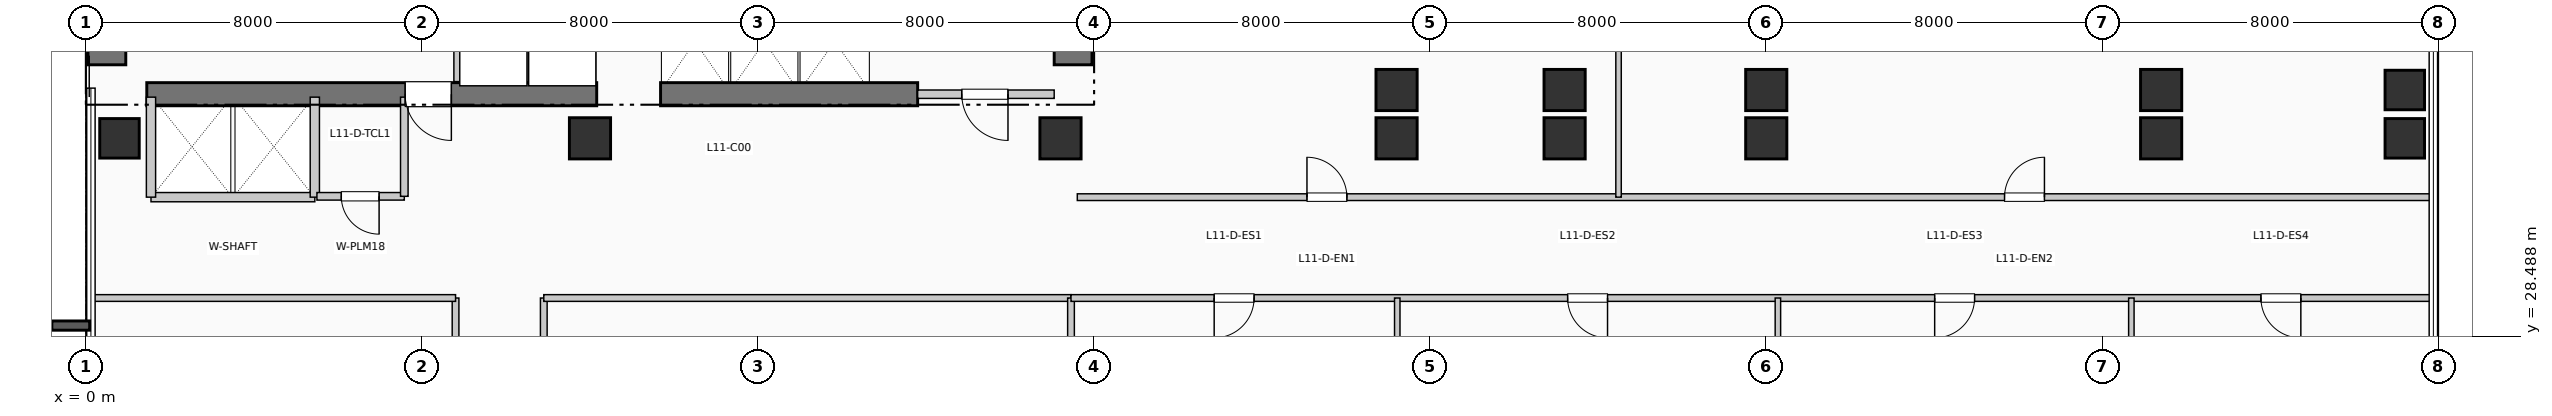
"""IFC4 building model, lengths in metres.
Left out: names, types, materials, properties, quantities, classifications, styles, units other than length and angle.
Written with IfcOpenShell. Run it as: python <this file> out.ifc"""

import sys

from ifc_helpers import new_model, si_unit, direction, frame, frame_2d, origin, origin_2d, place, context, subcontext, project, spatial, rectangle, extrude, element, fill, save


model = new_model("IFC4")
c1 = context("Model", 3, precision=1e-05, world=origin(), true_north=direction((0.0, 1.0)))
c2 = subcontext(c1, "Body", "Model", "MODEL_VIEW")
j1 = project(units=[si_unit("LENGTHUNIT", "METRE"), si_unit("PLANEANGLEUNIT", "RADIAN")], contexts=[c1])
p1 = place(None, origin())
s1 = spatial("IfcSite", under=j1, at=p1, CompositionType="ELEMENT")
p2 = place(p1, origin())
s2 = spatial("IfcBuilding", under=s1, at=p2, CompositionType="ELEMENT")
p3 = place(p2, frame((0.0, 0.0, 50.16)))
s3 = spatial("IfcBuildingStorey", under=s2, at=p3, CompositionType="ELEMENT", Elevation=50.16)
p4 = place(p3, frame((0.5, 34.95, 0.0), z_axis=(0.0, 0.0, 1.0), x_axis=(0.0, 1.0, 0.0)))
e1 = element("IfcWall", 1, at=p4, inside=s3, PredefinedType="SHEAR", context=c2, shape_type="SweptSolid", body=[
    extrude(rectangle(XDim=7.9, YDim=0.9, at=frame_2d((3.95, 0.0))), origin(), (0.0, 0.0, 1.0), 3.96),
])
p5 = place(p3, frame((23.5, 34.95, 0.0), z_axis=(0.0, 0.0, 1.0), x_axis=(0.0, 1.0, 0.0)))
e2 = element("IfcWall", 2, at=p5, inside=s3, PredefinedType="SHEAR", context=c2, shape_type="SweptSolid", body=[
    extrude(rectangle(XDim=10.64, YDim=0.9, at=frame_2d((5.32, 0.0))), origin(), (0.0, 0.0, 1.0), 3.96),
])
p6 = place(p3, frame((1.45, 34.25, 0.0), z_axis=(0.0, 0.0, 1.0), x_axis=(1.0, 0.0, 0.0)))
e3 = element("IfcWall", 3, at=p6, inside=s3, PredefinedType="SHEAR", context=c2, shape_type="SweptSolid", body=[
    extrude(rectangle(XDim=10.71, YDim=0.55, at=frame_2d((5.355, 0.0))), origin(), (0.0, 0.0, 1.0), 3.96),
])
p7 = place(p6, frame((7.25, 0.0, 0.0), z_axis=(0.0, 0.0, 1.0), x_axis=(-1.0, 0.0, 0.0)))
e4 = element("IfcOpeningElement", 4, at=p7, cuts=e3, PredefinedType="OPENING", context=c2, shape_type="SweptSolid", body=[
    extrude(rectangle(XDim=1.1, YDim=2.15, at=frame_2d((0.55, 1.075))), frame((0.0, 0.285, 0.0), z_axis=(0.0, -1.0, 0.0), x_axis=(1.0, 0.0, 0.0)), (0.0, 0.0, 1.0), 0.57),
])
p8 = place(p3, frame((13.68, 34.25, 0.0), z_axis=(0.0, 0.0, 1.0), x_axis=(1.0, 0.0, 0.0)))
e5 = element("IfcWall", 5, at=p8, inside=s3, PredefinedType="SHEAR", context=c2, shape_type="SweptSolid", body=[
    extrude(rectangle(XDim=6.12, YDim=0.55, at=frame_2d((3.06, 0.0))), origin(), (0.0, 0.0, 1.0), 3.96),
])
p9 = place(p3, frame((0.8, 33.2, 0.0), z_axis=(0.0, 0.0, 1.0), x_axis=(1.0, 0.0, 0.0)))
e6 = element("IfcColumn", 6, at=p9, inside=s3, PredefinedType="COLUMN", context=c2, shape_type="SweptSolid", body=[
    extrude(rectangle(XDim=0.94, YDim=0.94, at=origin_2d()), origin(), (0.0, 0.0, 1.0), 3.96),
])
for number, where, z_axis, x_axis in (
    (7, (12.0, 33.2, 0.0), (0.0, 0.0, 1.0), (1.0, 0.0, 0.0)),
    (8, (23.2, 33.2, 0.0), (0.0, 0.0, 1.0), (1.0, 0.0, 0.0)),
    (9, (31.2, 33.2, 0.0), (0.0, 0.0, 1.0), (1.0, 0.0, 0.0)),
    (10, (31.2, 34.35, 0.0), (0.0, 0.0, 1.0), (1.0, 0.0, 0.0)),
    (11, (35.2, 33.2, 0.0), (0.0, 0.0, 1.0), (1.0, 0.0, 0.0)),
    (12, (35.2, 34.35, 0.0), (0.0, 0.0, 1.0), (1.0, 0.0, 0.0)),
    (13, (40.0, 33.2, 0.0), (0.0, 0.0, 1.0), (1.0, 0.0, 0.0)),
    (14, (40.0, 34.35, 0.0), (0.0, 0.0, 1.0), (1.0, 0.0, 0.0)),
    (15, (49.4, 33.2, 0.0), (0.0, 0.0, 1.0), (1.0, 0.0, 0.0)),
    (16, (49.4, 34.35, 0.0), (0.0, 0.0, 1.0), (1.0, 0.0, 0.0)),
):
    element("IfcColumn", number, at=place(p3, frame(where, z_axis=z_axis, x_axis=x_axis)), inside=s3, PredefinedType="COLUMN", context=c2, shape_type="SweptSolid", body=[
        extrude(rectangle(XDim=0.98, YDim=0.98, at=origin_2d()), origin(), (0.0, 0.0, 1.0), 3.96),
    ])
for number, where, z_axis, x_axis in (
    (17, (55.2, 33.2, 0.0), (0.0, 0.0, 1.0), (1.0, 0.0, 0.0)),
    (18, (55.2, 34.35, 0.0), (0.0, 0.0, 1.0), (1.0, 0.0, 0.0)),
):
    element("IfcColumn", number, at=place(p3, frame(where, z_axis=z_axis, x_axis=x_axis)), inside=s3, PredefinedType="COLUMN", context=c2, shape_type="SweptSolid", body=[
        extrude(rectangle(XDim=0.94, YDim=0.94, at=origin_2d()), origin(), (0.0, 0.0, 1.0), 3.96),
    ])
p10 = place(p3, frame((8.86, 34.55, 0.0), z_axis=(0.0, 0.0, 1.0), x_axis=(0.0, 1.0, 0.0)))
e19 = element("IfcWall", 19, at=p10, inside=s3, PredefinedType="PARTITIONING", context=c2, shape_type="SweptSolid", body=[
    extrude(rectangle(XDim=2.5, YDim=0.2, at=frame_2d((1.25, 0.0))), origin(), (0.0, 0.0, 1.0), 3.71),
])
p11 = place(p3, frame((19.8, 34.25, 0.0), z_axis=(0.0, 0.0, 1.0), x_axis=(1.0, 0.0, 0.0)))
e20 = element("IfcWall", 20, at=p11, inside=s3, PredefinedType="PARTITIONING", context=c2, shape_type="SweptSolid", body=[
    extrude(rectangle(XDim=3.25, YDim=0.2, at=frame_2d((1.625, 0.0))), origin(), (0.0, 0.0, 1.0), 3.71),
])
p12 = place(p11, frame((2.15, 0.0, 0.0), z_axis=(0.0, 0.0, 1.0), x_axis=(-1.0, 0.0, 0.0)))
e21 = element("IfcOpeningElement", 21, at=p12, cuts=e20, PredefinedType="OPENING", context=c2, shape_type="SweptSolid", body=[
    extrude(rectangle(XDim=1.1, YDim=2.15, at=frame_2d((0.55, 1.075))), frame((0.0, 0.11, 0.0), z_axis=(0.0, -1.0, 0.0), x_axis=(1.0, 0.0, 0.0)), (0.0, 0.0, 1.0), 0.22),
])
p13 = place(p3, frame((1.55, 31.8, 0.0), z_axis=(0.0, 0.0, 1.0), x_axis=(1.0, 0.0, 0.0)))
e22 = element("IfcWall", 22, at=p13, inside=s3, PredefinedType="PARTITIONING", context=c2, shape_type="SweptSolid", body=[
    extrude(rectangle(XDim=3.9, YDim=0.22, at=frame_2d((1.95, 0.0))), origin(), (0.0, 0.0, 1.0), 3.71),
])
for number, where, z_axis, x_axis in (
    (23, (1.55, 31.8, 0.0), (0.0, 0.0, 1.0), (0.0, 1.0, 0.0)),
    (24, (5.45, 31.8, 0.0), (0.0, 0.0, 1.0), (0.0, 1.0, 0.0)),
):
    element("IfcWall", number, at=place(p3, frame(where, z_axis=z_axis, x_axis=x_axis)), inside=s3, PredefinedType="PARTITIONING", context=c2, shape_type="SweptSolid", body=[
        extrude(rectangle(XDim=2.38, YDim=0.22, at=frame_2d((1.19, 0.0))), origin(), (0.0, 0.0, 1.0), 3.71),
    ])
p14 = place(p3, frame((5.5, 31.82, 0.0), z_axis=(0.0, 0.0, 1.0), x_axis=(1.0, 0.0, 0.0)))
e25 = element("IfcWall", 25, at=p14, inside=s3, PredefinedType="PLUMBINGWALL", context=c2, shape_type="SweptSolid", body=[
    extrude(rectangle(XDim=2.08, YDim=0.18, at=frame_2d((1.04, 0.0))), origin(), (0.0, 0.0, 1.0), 3.71),
])
p15 = place(p14, frame((1.48, 0.0, 0.0), z_axis=(0.0, 0.0, 1.0), x_axis=(-1.0, 0.0, 0.0)))
e26 = element("IfcOpeningElement", 26, at=p15, cuts=e25, PredefinedType="OPENING", context=c2, shape_type="SweptSolid", body=[
    extrude(rectangle(XDim=0.9, YDim=2.1, at=frame_2d((0.45, 1.05))), frame((0.0, 0.1, 0.0), z_axis=(0.0, -1.0, 0.0), x_axis=(1.0, 0.0, 0.0)), (0.0, 0.0, 1.0), 0.2),
])
p16 = place(p3, frame((7.58, 31.82, 0.0), z_axis=(0.0, 0.0, 1.0), x_axis=(0.0, 1.0, 0.0)))
e27 = element("IfcWall", 27, at=p16, inside=s3, PredefinedType="PLUMBINGWALL", context=c2, shape_type="SweptSolid", body=[
    extrude(rectangle(XDim=2.36, YDim=0.18, at=frame_2d((1.18, 0.0))), origin(), (0.0, 0.0, 1.0), 3.71),
])
p17 = place(p3, frame((8.8, 5.24, 0.0), z_axis=(0.0, 0.0, 1.0), x_axis=(0.0, 1.0, 0.0)))
e28 = element("IfcWall", 28, at=p17, inside=s3, PredefinedType="PARTITIONING", context=c2, shape_type="SweptSolid", body=[
    extrude(rectangle(XDim=24.16, YDim=0.16, at=frame_2d((12.08, 0.0))), origin(), (0.0, 0.0, 1.0), 3.71),
])
p18 = place(p17, frame((3.495, 0.0, 0.0), z_axis=(0.0, 0.0, 1.0), x_axis=(-1.0, 0.0, 0.0)))
e29 = element("IfcOpeningElement", 29, at=p18, cuts=e28, PredefinedType="OPENING", context=c2, shape_type="SweptSolid", body=[
    extrude(rectangle(XDim=0.95, YDim=2.15, at=frame_2d((0.475, 1.075))), frame((0.0, 0.09, 0.0), z_axis=(0.0, -1.0, 0.0), x_axis=(1.0, 0.0, 0.0)), (0.0, 0.0, 1.0), 0.18),
])
p19 = place(p17, frame((10.018, 0.0, 0.0), z_axis=(0.0, 0.0, 1.0), x_axis=(-1.0, 0.0, 0.0)))
e30 = element("IfcOpeningElement", 30, at=p19, cuts=e28, PredefinedType="OPENING", context=c2, shape_type="SweptSolid", body=[
    extrude(rectangle(XDim=0.95, YDim=2.15, at=frame_2d((0.475, 1.075))), frame((0.0, 0.09, 0.0), z_axis=(0.0, -1.0, 0.0), x_axis=(1.0, 0.0, 0.0)), (0.0, 0.0, 1.0), 0.18),
])
p20 = place(p17, frame((16.662, 0.0, 0.0), z_axis=(0.0, 0.0, 1.0), x_axis=(-1.0, 0.0, 0.0)))
e31 = element("IfcOpeningElement", 31, at=p20, cuts=e28, PredefinedType="OPENING", context=c2, shape_type="SweptSolid", body=[
    extrude(rectangle(XDim=0.95, YDim=2.15, at=frame_2d((0.475, 1.075))), frame((0.0, 0.09, 0.0), z_axis=(0.0, -1.0, 0.0), x_axis=(1.0, 0.0, 0.0)), (0.0, 0.0, 1.0), 0.18),
])
p21 = place(p17, frame((22.219, 0.0, 0.0), z_axis=(0.0, 0.0, 1.0), x_axis=(-1.0, 0.0, 0.0)))
e32 = element("IfcOpeningElement", 32, at=p21, cuts=e28, PredefinedType="OPENING", context=c2, shape_type="SweptSolid", body=[
    extrude(rectangle(XDim=0.95, YDim=2.15, at=frame_2d((0.475, 1.075))), frame((0.0, 0.09, 0.0), z_axis=(0.0, -1.0, 0.0), x_axis=(1.0, 0.0, 0.0)), (0.0, 0.0, 1.0), 0.18),
])
p22 = place(p3, frame((10.9, 5.24, 0.0), z_axis=(0.0, 0.0, 1.0), x_axis=(0.0, 1.0, 0.0)))
e33 = element("IfcWall", 33, at=p22, inside=s3, PredefinedType="PARTITIONING", context=c2, shape_type="SweptSolid", body=[
    extrude(rectangle(XDim=24.16, YDim=0.16, at=frame_2d((12.08, 0.0))), origin(), (0.0, 0.0, 1.0), 3.71),
])
p23 = place(p22, frame((3.753, 0.0, 0.0)))
e34 = element("IfcOpeningElement", 34, at=p23, cuts=e33, PredefinedType="OPENING", context=c2, shape_type="SweptSolid", body=[
    extrude(rectangle(XDim=0.95, YDim=2.15, at=frame_2d((0.475, 1.075))), frame((0.0, 0.09, 0.0), z_axis=(0.0, -1.0, 0.0), x_axis=(1.0, 0.0, 0.0)), (0.0, 0.0, 1.0), 0.18),
])
p24 = place(p22, frame((11.209, 0.0, 0.0)))
e35 = element("IfcOpeningElement", 35, at=p24, cuts=e33, PredefinedType="OPENING", context=c2, shape_type="SweptSolid", body=[
    extrude(rectangle(XDim=0.95, YDim=2.15, at=frame_2d((0.475, 1.075))), frame((0.0, 0.09, 0.0), z_axis=(0.0, -1.0, 0.0), x_axis=(1.0, 0.0, 0.0)), (0.0, 0.0, 1.0), 0.18),
])
p25 = place(p22, frame((20.061, 0.0, 0.0)))
e36 = element("IfcOpeningElement", 36, at=p25, cuts=e33, PredefinedType="OPENING", context=c2, shape_type="SweptSolid", body=[
    extrude(rectangle(XDim=0.95, YDim=2.15, at=frame_2d((0.475, 1.075))), frame((0.0, 0.09, 0.0), z_axis=(0.0, -1.0, 0.0), x_axis=(1.0, 0.0, 0.0)), (0.0, 0.0, 1.0), 0.18),
])
p26 = place(p3, frame((0.19, 29.4, 0.0), z_axis=(0.0, 0.0, 1.0), x_axis=(1.0, 0.0, 0.0)))
e37 = element("IfcWall", 37, at=p26, inside=s3, PredefinedType="PARTITIONING", context=c2, shape_type="SweptSolid", body=[
    extrude(rectangle(XDim=8.61, YDim=0.16, at=frame_2d((4.305, 0.0))), origin(), (0.0, 0.0, 1.0), 3.365),
])
p27 = place(p3, frame((10.9, 29.4, 0.0), z_axis=(0.0, 0.0, 1.0), x_axis=(1.0, 0.0, 0.0)))
e38 = element("IfcWall", 38, at=p27, inside=s3, PredefinedType="PARTITIONING", context=c2, shape_type="SweptSolid", body=[
    extrude(rectangle(XDim=12.55, YDim=0.16, at=frame_2d((6.275, 0.0))), origin(), (0.0, 0.0, 1.0), 3.365),
])
p28 = place(p3, frame((23.45, 1.04, 0.0), z_axis=(0.0, 0.0, 1.0), x_axis=(0.0, 1.0, 0.0)))
e39 = element("IfcWall", 39, at=p28, inside=s3, PredefinedType="PARTITIONING", context=c2, shape_type="SweptSolid", body=[
    extrude(rectangle(XDim=28.36, YDim=0.16, at=frame_2d((14.18, 0.0))), origin(), (0.0, 0.0, 1.0), 2.995),
])
p29 = place(p3, frame((23.45, 29.4, 0.0), z_axis=(0.0, 0.0, 1.0), x_axis=(1.0, 0.0, 0.0)))
e40 = element("IfcWall", 40, at=p29, inside=s3, PredefinedType="PARTITIONING", context=c2, shape_type="SweptSolid", body=[
    extrude(rectangle(XDim=32.36, YDim=0.16, at=frame_2d((16.18, 0.0))), origin(), (0.0, 0.0, 1.0), 3.365),
])
p30 = place(p29, frame((4.358, 0.0, 0.0), z_axis=(0.0, 0.0, 1.0), x_axis=(-1.0, 0.0, 0.0)))
e41 = element("IfcOpeningElement", 41, at=p30, cuts=e40, PredefinedType="OPENING", context=c2, shape_type="SweptSolid", body=[
    extrude(rectangle(XDim=0.95, YDim=2.15, at=frame_2d((0.475, 1.075))), frame((0.0, 0.09, 0.0), z_axis=(0.0, -1.0, 0.0), x_axis=(1.0, 0.0, 0.0)), (0.0, 0.0, 1.0), 0.18),
])
p31 = place(p29, frame((12.772, 0.0, 0.0), z_axis=(0.0, 0.0, 1.0), x_axis=(-1.0, 0.0, 0.0)))
e42 = element("IfcOpeningElement", 42, at=p31, cuts=e40, PredefinedType="OPENING", context=c2, shape_type="SweptSolid", body=[
    extrude(rectangle(XDim=0.95, YDim=2.15, at=frame_2d((0.475, 1.075))), frame((0.0, 0.09, 0.0), z_axis=(0.0, -1.0, 0.0), x_axis=(1.0, 0.0, 0.0)), (0.0, 0.0, 1.0), 0.18),
])
p32 = place(p29, frame((21.509, 0.0, 0.0), z_axis=(0.0, 0.0, 1.0), x_axis=(-1.0, 0.0, 0.0)))
e43 = element("IfcOpeningElement", 43, at=p32, cuts=e40, PredefinedType="OPENING", context=c2, shape_type="SweptSolid", body=[
    extrude(rectangle(XDim=0.95, YDim=2.15, at=frame_2d((0.475, 1.075))), frame((0.0, 0.09, 0.0), z_axis=(0.0, -1.0, 0.0), x_axis=(1.0, 0.0, 0.0)), (0.0, 0.0, 1.0), 0.18),
])
p33 = place(p29, frame((29.275, 0.0, 0.0), z_axis=(0.0, 0.0, 1.0), x_axis=(-1.0, 0.0, 0.0)))
e44 = element("IfcOpeningElement", 44, at=p33, cuts=e40, PredefinedType="OPENING", context=c2, shape_type="SweptSolid", body=[
    extrude(rectangle(XDim=0.95, YDim=2.15, at=frame_2d((0.475, 1.075))), frame((0.0, 0.09, 0.0), z_axis=(0.0, -1.0, 0.0), x_axis=(1.0, 0.0, 0.0)), (0.0, 0.0, 1.0), 0.18),
])
p34 = place(p3, frame((23.6, 31.8, 0.0), z_axis=(0.0, 0.0, 1.0), x_axis=(1.0, 0.0, 0.0)))
e45 = element("IfcWall", 45, at=p34, inside=s3, PredefinedType="PARTITIONING", context=c2, shape_type="SweptSolid", body=[
    extrude(rectangle(XDim=32.21, YDim=0.16, at=frame_2d((16.105, 0.0))), origin(), (0.0, 0.0, 1.0), 3.71),
])
p35 = place(p34, frame((5.467, 0.0, 0.0)))
e46 = element("IfcOpeningElement", 46, at=p35, cuts=e45, PredefinedType="OPENING", context=c2, shape_type="SweptSolid", body=[
    extrude(rectangle(XDim=0.95, YDim=2.15, at=frame_2d((0.475, 1.075))), frame((0.0, 0.09, 0.0), z_axis=(0.0, -1.0, 0.0), x_axis=(1.0, 0.0, 0.0)), (0.0, 0.0, 1.0), 0.18),
])
p36 = place(p34, frame((22.072, 0.0, 0.0)))
e47 = element("IfcOpeningElement", 47, at=p36, cuts=e45, PredefinedType="OPENING", context=c2, shape_type="SweptSolid", body=[
    extrude(rectangle(XDim=0.95, YDim=2.15, at=frame_2d((0.475, 1.075))), frame((0.0, 0.09, 0.0), z_axis=(0.0, -1.0, 0.0), x_axis=(1.0, 0.0, 0.0)), (0.0, 0.0, 1.0), 0.18),
])
for number, where, z_axis, x_axis in (
    (48, (31.216, 18.19, 0.0), (0.0, 0.0, 1.0), (0.0, 1.0, 0.0)),
    (49, (40.277, 18.19, 0.0), (0.0, 0.0, 1.0), (0.0, 1.0, 0.0)),
):
    element("IfcWall", number, at=place(p3, frame(where, z_axis=z_axis, x_axis=x_axis)), inside=s3, PredefinedType="PARTITIONING", context=c2, shape_type="SweptSolid", body=[
        extrude(rectangle(XDim=11.21, YDim=0.13, at=frame_2d((5.605, 0.0))), origin(), (0.0, 0.0, 1.0), 2.995),
    ])
p37 = place(p3, frame((48.691, 18.19, 0.0), z_axis=(0.0, 0.0, 1.0), x_axis=(0.0, 1.0, 0.0)))
e50 = element("IfcWall", 50, at=p37, inside=s3, PredefinedType="PARTITIONING", context=c2, shape_type="SweptSolid", body=[
    extrude(rectangle(XDim=11.21, YDim=0.13, at=frame_2d((5.605, 0.0))), origin(), (0.0, 0.0, 1.0), 3.71),
])
p38 = place(p3, frame((36.484, 31.8, 0.0), z_axis=(0.0, 0.0, 1.0), x_axis=(0.0, 1.0, 0.0)))
e51 = element("IfcWall", 51, at=p38, inside=s3, PredefinedType="PARTITIONING", context=c2, shape_type="SweptSolid", body=[
    extrude(rectangle(XDim=14.01, YDim=0.13, at=frame_2d((7.005, 0.0))), origin(), (0.0, 0.0, 1.0), 3.71),
])
p39 = place(p7, origin())
e52 = element("IfcDoor", 52, at=p39, inside=s3, OperationType="SINGLE_SWING_RIGHT", PredefinedType="DOOR", context=c2, shape_type="SweptSolid", body=[
    extrude(rectangle(XDim=1.1, YDim=2.15, at=frame_2d((0.55, 1.075))), frame((0.0, 0.025, 0.0), z_axis=(0.0, -1.0, 0.0), x_axis=(1.0, 0.0, 0.0)), (0.0, 0.0, 1.0), 0.05),
])
fill(e4, e52)
p40 = place(p12, origin())
e53 = element("IfcDoor", 53, at=p40, inside=s3, OperationType="SINGLE_SWING_RIGHT", PredefinedType="DOOR", context=c2, shape_type="SweptSolid", body=[
    extrude(rectangle(XDim=1.1, YDim=2.15, at=frame_2d((0.55, 1.075))), frame((0.0, 0.025, 0.0), z_axis=(0.0, -1.0, 0.0), x_axis=(1.0, 0.0, 0.0)), (0.0, 0.0, 1.0), 0.05),
])
fill(e21, e53)
p41 = place(p15, origin())
e54 = element("IfcDoor", 54, at=p41, inside=s3, OperationType="SINGLE_SWING_RIGHT", PredefinedType="DOOR", context=c2, shape_type="SweptSolid", body=[
    extrude(rectangle(XDim=0.9, YDim=2.1, at=frame_2d((0.45, 1.05))), frame((0.0, 0.025, 0.0), z_axis=(0.0, -1.0, 0.0), x_axis=(1.0, 0.0, 0.0)), (0.0, 0.0, 1.0), 0.05),
])
fill(e26, e54)
p42 = place(p30, origin())
e55 = element("IfcDoor", 55, at=p42, inside=s3, OperationType="SINGLE_SWING_LEFT", PredefinedType="DOOR", context=c2, shape_type="SweptSolid", body=[
    extrude(rectangle(XDim=0.95, YDim=2.15, at=frame_2d((0.475, 1.075))), frame((0.0, 0.025, 0.0), z_axis=(0.0, -1.0, 0.0), x_axis=(1.0, 0.0, 0.0)), (0.0, 0.0, 1.0), 0.05),
])
fill(e41, e55)
p43 = place(p31, origin())
e56 = element("IfcDoor", 56, at=p43, inside=s3, OperationType="SINGLE_SWING_RIGHT", PredefinedType="DOOR", context=c2, shape_type="SweptSolid", body=[
    extrude(rectangle(XDim=0.95, YDim=2.15, at=frame_2d((0.475, 1.075))), frame((0.0, 0.025, 0.0), z_axis=(0.0, -1.0, 0.0), x_axis=(1.0, 0.0, 0.0)), (0.0, 0.0, 1.0), 0.05),
])
fill(e42, e56)
p44 = place(p32, origin())
e57 = element("IfcDoor", 57, at=p44, inside=s3, OperationType="SINGLE_SWING_LEFT", PredefinedType="DOOR", context=c2, shape_type="SweptSolid", body=[
    extrude(rectangle(XDim=0.95, YDim=2.15, at=frame_2d((0.475, 1.075))), frame((0.0, 0.025, 0.0), z_axis=(0.0, -1.0, 0.0), x_axis=(1.0, 0.0, 0.0)), (0.0, 0.0, 1.0), 0.05),
])
fill(e43, e57)
p45 = place(p33, origin())
e58 = element("IfcDoor", 58, at=p45, inside=s3, OperationType="SINGLE_SWING_RIGHT", PredefinedType="DOOR", context=c2, shape_type="SweptSolid", body=[
    extrude(rectangle(XDim=0.95, YDim=2.15, at=frame_2d((0.475, 1.075))), frame((0.0, 0.025, 0.0), z_axis=(0.0, -1.0, 0.0), x_axis=(1.0, 0.0, 0.0)), (0.0, 0.0, 1.0), 0.05),
])
fill(e44, e58)
p46 = place(p35, origin())
e59 = element("IfcDoor", 59, at=p46, inside=s3, OperationType="SINGLE_SWING_LEFT", PredefinedType="DOOR", context=c2, shape_type="SweptSolid", body=[
    extrude(rectangle(XDim=0.95, YDim=2.15, at=frame_2d((0.475, 1.075))), frame((0.0, 0.025, 0.0), z_axis=(0.0, -1.0, 0.0), x_axis=(1.0, 0.0, 0.0)), (0.0, 0.0, 1.0), 0.05),
])
fill(e46, e59)
p47 = place(p36, origin())
e60 = element("IfcDoor", 60, at=p47, inside=s3, OperationType="SINGLE_SWING_RIGHT", PredefinedType="DOOR", context=c2, shape_type="SweptSolid", body=[
    extrude(rectangle(XDim=0.95, YDim=2.15, at=frame_2d((0.475, 1.075))), frame((0.0, 0.025, 0.0), z_axis=(0.0, -1.0, 0.0), x_axis=(1.0, 0.0, 0.0)), (0.0, 0.0, 1.0), 0.05),
])
fill(e47, e60)
save(model, sys.argv[1])
